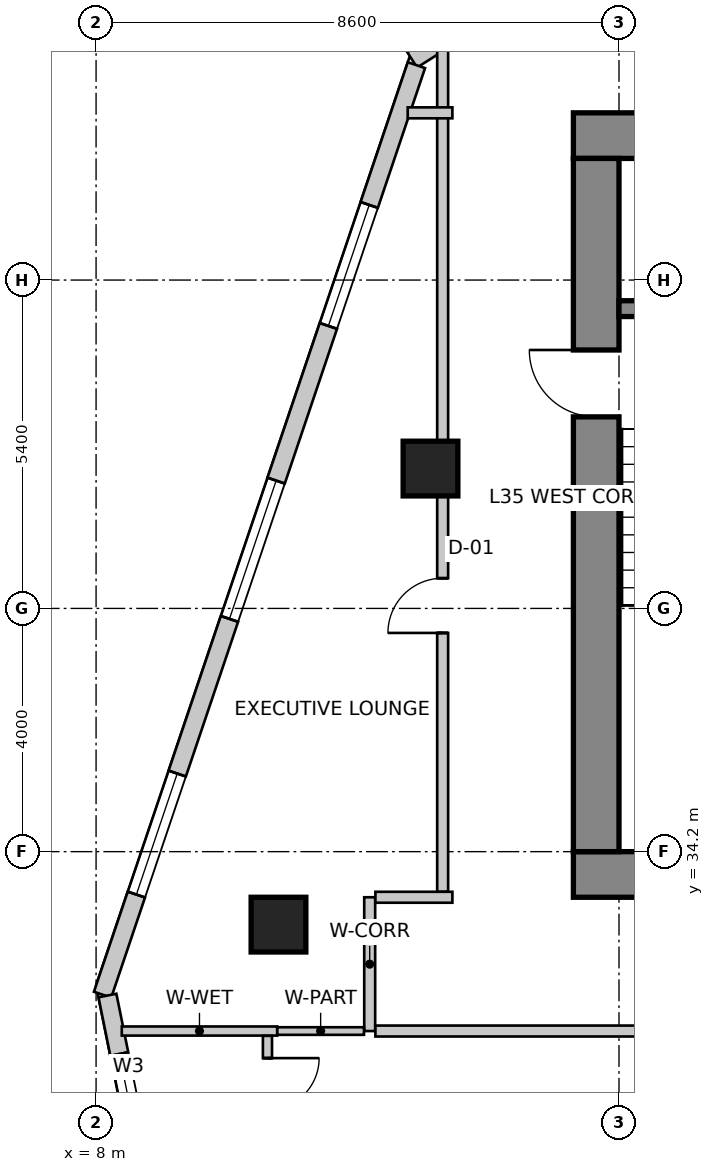
"""IFC4 building model, lengths in metres.
Left out: names, types, materials, properties, quantities, classifications, styles, units other than length and angle.
Written with IfcOpenShell. Run it as: python <this file> out.ifc"""

import sys

from ifc_helpers import new_model, si_unit, direction, frame, frame_2d, origin, origin_2d, place, context, subcontext, project, spatial, rectangle, extrude, source, transform, mapped, element, fill, save


model = new_model("IFC4")
c1 = context("Model", 3, precision=1e-05, world=origin(), true_north=direction((0.0, 1.0)))
c2 = subcontext(c1, "Body", "Model", "MODEL_VIEW")
j1 = project(units=[si_unit("LENGTHUNIT", "METRE"), si_unit("PLANEANGLEUNIT", "RADIAN")], contexts=[c1])
p1 = place(None, origin())
s1 = spatial("IfcSite", under=j1, at=p1, CompositionType="ELEMENT")
p2 = place(p1, origin())
s2 = spatial("IfcBuilding", under=s1, at=p2, CompositionType="ELEMENT")
p3 = place(p2, frame((0.0, 0.0, 143.0)))
s3 = spatial("IfcBuildingStorey", under=s2, at=p3, CompositionType="ELEMENT", Elevation=143.0)
p4 = place(p3, frame((15.85, 45.975, 0.0), z_axis=(0.0, 0.0, 1.0), x_axis=(1.0, 0.0, 0.0)))
e1 = element("IfcWall", 1, at=p4, inside=s3, PredefinedType="SHEAR", context=c2, shape_type="SweptSolid", body=[
    extrude(rectangle(XDim=15.9, YDim=0.75, at=frame_2d((7.95, 0.0))), origin(), (0.0, 0.0, 1.0), 3.6),
])
p5 = place(p3, frame((15.85, 33.825, 0.0), z_axis=(0.0, 0.0, 1.0), x_axis=(1.0, 0.0, 0.0)))
e2 = element("IfcWall", 2, at=p5, inside=s3, PredefinedType="SHEAR", context=c2, shape_type="SweptSolid", body=[
    extrude(rectangle(XDim=15.9, YDim=0.75, at=frame_2d((7.95, 0.0))), origin(), (0.0, 0.0, 1.0), 3.6),
])
m1 = source(origin(), c2, "Body", "SweptSolid", [
    extrude(rectangle(XDim=1.3, YDim=2.15, at=frame_2d((0.65, 1.075))), frame((0.0, 0.385, 0.0), z_axis=(0.0, -1.0, 0.0), x_axis=(1.0, 0.0, 0.0)), (0.0, 0.0, 1.0), 0.77),
])
p6 = place(p5, frame((10.08, 0.0, 0.0)))
e3 = element("IfcOpeningElement", 3, at=p6, cuts=e2, PredefinedType="OPENING", context=c2, shape_type="MappedRepresentation", body=[
    mapped(m1, transform((0.0, 0.0, 0.0), scale=1.0)),
])
p7 = place(p3, frame((16.225, 34.2, 0.0), z_axis=(0.0, 0.0, 1.0), x_axis=(0.0, 1.0, 0.0)))
e4 = element("IfcWall", 4, at=p7, inside=s3, PredefinedType="SHEAR", context=c2, shape_type="SweptSolid", body=[
    extrude(rectangle(XDim=11.4, YDim=0.75, at=frame_2d((5.7, 0.0))), origin(), (0.0, 0.0, 1.0), 3.6),
])
m2 = source(origin(), c2, "Body", "SweptSolid", [
    extrude(rectangle(XDim=1.1, YDim=2.15, at=frame_2d((0.55, 1.075))), frame((0.0, 0.385, 0.0), z_axis=(0.0, -1.0, 0.0), x_axis=(1.0, 0.0, 0.0)), (0.0, 0.0, 1.0), 0.77),
])
p8 = place(p7, frame((7.15, 0.0, 0.0)))
e5 = element("IfcOpeningElement", 5, at=p8, cuts=e4, PredefinedType="OPENING", context=c2, shape_type="MappedRepresentation", body=[
    mapped(m2, transform((0.0, 0.0, 0.0), scale=1.0)),
])
p9 = place(p3, frame((16.6, 43.13, 0.0), z_axis=(0.0, 0.0, 1.0), x_axis=(1.0, 0.0, 0.0)))
e6 = element("IfcWall", 6, at=p9, inside=s3, PredefinedType="SHEAR", context=c2, shape_type="SweptSolid", body=[
    extrude(rectangle(XDim=3.5, YDim=0.26, at=frame_2d((1.75, 0.0))), origin(), (0.0, 0.0, 1.0), 3.6),
])
m3 = source(origin(), c2, "Body", "SweptSolid", [
    extrude(rectangle(XDim=0.9, YDim=0.9, at=origin_2d()), origin(), (0.0, 0.0, 1.0), 3.6),
])
for number, where, z_axis, x_axis in (
    (7, (11.0, 33.0, 0.0), (0.0, 0.0, 1.0), (1.0, 0.0, 0.0)),
    (8, (13.5, 40.5, 0.0), (0.0, 0.0, 1.0), (1.0, 0.0, 0.0)),
):
    element("IfcColumn", number, at=place(p3, frame(where, z_axis=z_axis, x_axis=x_axis)), inside=s3, PredefinedType="COLUMN", context=c2, shape_type="MappedRepresentation", body=[
        mapped(m3, transform((0.0, 0.0, 0.0), scale=1.0)),
    ])
p10 = place(p3, frame((21.875, 52.742, 0.0), z_axis=(0.0, 0.0, 1.0), x_axis=(-0.843662465249, -0.536873956092, 0.0)))
e9 = element("IfcWall", 9, at=p10, inside=s3, PredefinedType="SOLIDWALL", context=c2, shape_type="SweptSolid", body=[
    extrude(rectangle(XDim=10.284, YDim=0.3, at=frame_2d((5.142, 0.0))), origin(), (0.0, 0.0, 1.0), 3.35),
])
m4 = source(origin(), c2, "Body", "SweptSolid", [
    extrude(rectangle(XDim=2.4, YDim=2.2, at=frame_2d((1.2, 1.1))), frame((0.0, 0.16, 0.0), z_axis=(0.0, -1.0, 0.0), x_axis=(1.0, 0.0, 0.0)), (0.0, 0.0, 1.0), 0.32),
])
p11 = place(p10, frame((2.656, 0.0, 0.85)))
e10 = element("IfcOpeningElement", 10, at=p11, cuts=e9, PredefinedType="OPENING", context=c2, shape_type="MappedRepresentation", body=[
    mapped(m4, transform((0.0, 0.0, 0.0), scale=1.0)),
])
m5 = source(origin(), c2, "Body", "SweptSolid", [
    extrude(rectangle(XDim=1.5, YDim=1.8, at=frame_2d((0.75, 0.9))), frame((0.0, 0.16, 0.0), z_axis=(0.0, -1.0, 0.0), x_axis=(1.0, 0.0, 0.0)), (0.0, 0.0, 1.0), 0.32),
])
p12 = place(p10, frame((7.937, 0.0, 0.85)))
e11 = element("IfcOpeningElement", 11, at=p12, cuts=e9, PredefinedType="OPENING", context=c2, shape_type="MappedRepresentation", body=[
    mapped(m5, transform((0.0, 0.0, 0.0), scale=1.0)),
])
p13 = place(p3, frame((13.269, 47.134, 0.0), z_axis=(0.0, 0.0, 1.0), x_axis=(-0.319929773322, -0.947441259468, 0.0)))
e12 = element("IfcWall", 12, at=p13, inside=s3, PredefinedType="SOLIDWALL", context=c2, shape_type="SweptSolid", body=[
    extrude(rectangle(XDim=16.134, YDim=0.3, at=frame_2d((8.067, 0.0))), origin(), (0.0, 0.0, 1.0), 3.35),
])
m6 = source(origin(), c2, "Body", "SweptSolid", [
    extrude(rectangle(XDim=2.1, YDim=2.0, at=frame_2d((1.05, 1.0))), frame((0.0, 0.16, 0.0), z_axis=(0.0, -1.0, 0.0), x_axis=(1.0, 0.0, 0.0)), (0.0, 0.0, 1.0), 0.32),
])
p14 = place(p13, frame((2.426, 0.0, 0.85)))
e13 = element("IfcOpeningElement", 13, at=p14, cuts=e12, PredefinedType="OPENING", context=c2, shape_type="MappedRepresentation", body=[
    mapped(m6, transform((0.0, 0.0, 0.0), scale=1.0)),
])
p15 = place(p13, frame((7.211, 0.0, 0.85)))
e14 = element("IfcOpeningElement", 14, at=p15, cuts=e12, PredefinedType="OPENING", context=c2, shape_type="MappedRepresentation", body=[
    mapped(m4, transform((0.0, 0.0, 0.0), scale=1.0)),
])
p16 = place(p13, frame((12.296, 0.0, 0.85)))
e15 = element("IfcOpeningElement", 15, at=p16, cuts=e12, PredefinedType="OPENING", context=c2, shape_type="MappedRepresentation", body=[
    mapped(m6, transform((0.0, 0.0, 0.0), scale=1.0)),
])
p17 = place(p3, frame((8.187, 31.834, 0.0), z_axis=(0.0, 0.0, 1.0), x_axis=(0.198869838988, -0.980025911464, 0.0)))
e16 = element("IfcWall", 16, at=p17, inside=s3, PredefinedType="SOLIDWALL", context=c2, shape_type="SweptSolid", body=[
    extrude(rectangle(XDim=16.363, YDim=0.3, at=frame_2d((8.182, 0.0))), origin(), (0.0, 0.0, 1.0), 3.35),
])
p18 = place(p17, frame((0.981, 0.0, 0.85)))
e17 = element("IfcOpeningElement", 17, at=p18, cuts=e16, PredefinedType="OPENING", context=c2, shape_type="MappedRepresentation", body=[
    mapped(m5, transform((0.0, 0.0, 0.0), scale=1.0)),
])
p19 = place(p17, frame((4.195, 0.0, 0.85)))
e18 = element("IfcOpeningElement", 18, at=p19, cuts=e16, PredefinedType="OPENING", context=c2, shape_type="MappedRepresentation", body=[
    mapped(m4, transform((0.0, 0.0, 0.0), scale=1.0)),
])
p20 = place(p17, frame((9.007, 0.0, 0.85)))
e19 = element("IfcOpeningElement", 19, at=p20, cuts=e16, PredefinedType="OPENING", context=c2, shape_type="MappedRepresentation", body=[
    mapped(m6, transform((0.0, 0.0, 0.0), scale=1.0)),
])
p21 = place(p17, frame((13.236, 0.0, 0.85)))
e20 = element("IfcOpeningElement", 20, at=p21, cuts=e16, PredefinedType="OPENING", context=c2, shape_type="MappedRepresentation", body=[
    mapped(m4, transform((0.0, 0.0, 0.0), scale=1.0)),
])
p22 = place(p3, frame((12.5, 31.25, 0.0), z_axis=(0.0, 0.0, 1.0), x_axis=(0.0, 1.0, 0.0)))
e21 = element("IfcWall", 21, at=p22, inside=s3, PredefinedType="PARTITIONING", context=c2, shape_type="SweptSolid", body=[
    extrude(rectangle(XDim=2.2, YDim=0.18, at=frame_2d((1.1, 0.0))), origin(), (0.0, 0.0, 1.0), 3.034),
])
p23 = place(p3, frame((12.594, 33.45, 0.0), z_axis=(0.0, 0.0, 1.0), x_axis=(1.0, 0.0, 0.0)))
e22 = element("IfcWall", 22, at=p23, inside=s3, PredefinedType="PARTITIONING", context=c2, shape_type="SweptSolid", body=[
    extrude(rectangle(XDim=1.266, YDim=0.18, at=frame_2d((0.633, 0.0))), origin(), (0.0, 0.0, 1.0), 3.35),
])
p24 = place(p3, frame((17.96, 31.25, 0.0), z_axis=(0.0, 0.0, 1.0), x_axis=(-1.0, 0.0, 0.0)))
e23 = element("IfcWall", 23, at=p24, inside=s3, PredefinedType="PARTITIONING", context=c2, shape_type="SweptSolid", body=[
    extrude(rectangle(XDim=5.366, YDim=0.18, at=frame_2d((2.683, 0.0))), origin(), (0.0, 0.0, 1.0), 3.034),
])
p25 = place(p3, frame((13.7, 33.544, 0.0), z_axis=(0.0, 0.0, 1.0), x_axis=(0.0, 1.0, 0.0)))
e24 = element("IfcWall", 24, at=p25, inside=s3, PredefinedType="PARTITIONING", context=c2, shape_type="SweptSolid", body=[
    extrude(rectangle(XDim=13.86, YDim=0.18, at=frame_2d((6.93, 0.0))), origin(), (0.0, 0.0, 1.0), 2.492),
])
m7 = source(origin(), c2, "Body", "SweptSolid", [
    extrude(rectangle(XDim=0.9, YDim=2.15, at=frame_2d((0.45, 1.075))), frame((0.0, 0.1, 0.0), z_axis=(0.0, -1.0, 0.0), x_axis=(1.0, 0.0, 0.0)), (0.0, 0.0, 1.0), 0.2),
])
p26 = place(p25, frame((4.253, 0.0, 0.0)))
e25 = element("IfcOpeningElement", 25, at=p26, cuts=e24, PredefinedType="OPENING", context=c2, shape_type="MappedRepresentation", body=[
    mapped(m7, transform((0.0, 0.0, 0.0), scale=1.0)),
])
p27 = place(p3, frame((13.86, 46.35, 0.0), z_axis=(0.0, 0.0, 1.0), x_axis=(-1.0, 0.0, 0.0)))
e26 = element("IfcWall", 26, at=p27, inside=s3, PredefinedType="PARTITIONING", context=c2, shape_type="SweptSolid", body=[
    extrude(rectangle(XDim=0.735, YDim=0.18, at=frame_2d((0.367, 0.0))), origin(), (0.0, 0.0, 1.0), 3.35),
])
p28 = place(p3, frame((10.979, 31.25, 0.0), z_axis=(0.0, 0.0, 1.0), x_axis=(-1.0, 0.0, 0.0)))
e27 = element("IfcWall", 27, at=p28, inside=s3, PredefinedType="PARTITIONING", context=c2, shape_type="SweptSolid", body=[
    extrude(rectangle(XDim=2.556, YDim=0.15, at=frame_2d((1.278, 0.0))), origin(), (0.0, 0.0, 1.0), 2.492),
])
p29 = place(p3, frame((12.406, 31.25, 0.0), z_axis=(0.0, 0.0, 1.0), x_axis=(-1.0, 0.0, 0.0)))
e28 = element("IfcWall", 28, at=p29, inside=s3, PredefinedType="PARTITIONING", context=c2, shape_type="SweptSolid", body=[
    extrude(rectangle(XDim=1.426, YDim=0.125, at=frame_2d((0.713, 0.0))), origin(), (0.0, 0.0, 1.0), 2.492),
])
p30 = place(p3, frame((10.819, 31.171, 0.0), z_axis=(0.0, 0.0, 1.0), x_axis=(0.0, -1.0, 0.0)))
e29 = element("IfcWall", 29, at=p30, inside=s3, PredefinedType="PARTITIONING", context=c2, shape_type="SweptSolid", body=[
    extrude(rectangle(XDim=2.101, YDim=0.15, at=frame_2d((1.05, 0.0))), origin(), (0.0, 0.0, 1.0), 2.492),
])
m8 = source(origin(), c2, "Body", "SweptSolid", [
    extrude(rectangle(XDim=0.85, YDim=2.15, at=frame_2d((0.425, 1.075))), frame((0.0, 0.085, 0.0), z_axis=(0.0, -1.0, 0.0), x_axis=(1.0, 0.0, 0.0)), (0.0, 0.0, 1.0), 0.17),
])
p31 = place(p30, frame((0.366, 0.0, 0.0)))
e30 = element("IfcOpeningElement", 30, at=p31, cuts=e29, PredefinedType="OPENING", context=c2, shape_type="MappedRepresentation", body=[
    mapped(m8, transform((0.0, 0.0, 0.0), scale=1.0)),
])
m9 = source(origin(), c2, "Body", "SweptSolid", [
    extrude(rectangle(XDim=2.1, YDim=2.0, at=frame_2d((1.05, 1.0))), frame((0.0, -0.015, 0.0), z_axis=(0.0, -1.0, 0.0), x_axis=(1.0, 0.0, 0.0)), (0.0, 0.0, 1.0), 0.06),
])
p32 = place(p14, origin())
e31 = element("IfcWindow", 31, at=p32, inside=s3, PartitioningType="SINGLE_PANEL", PredefinedType="WINDOW", context=c2, shape_type="MappedRepresentation", body=[
    mapped(m9, transform((0.0, 0.0, 0.0), scale=1.0)),
])
fill(e13, e31)
m10 = source(origin(), c2, "Body", "SweptSolid", [
    extrude(rectangle(XDim=2.4, YDim=2.2, at=frame_2d((1.2, 1.1))), frame((0.0, -0.015, 0.0), z_axis=(0.0, -1.0, 0.0), x_axis=(1.0, 0.0, 0.0)), (0.0, 0.0, 1.0), 0.06),
])
p33 = place(p15, origin())
e32 = element("IfcWindow", 32, at=p33, inside=s3, PartitioningType="SINGLE_PANEL", PredefinedType="WINDOW", context=c2, shape_type="MappedRepresentation", body=[
    mapped(m10, transform((0.0, 0.0, 0.0), scale=1.0)),
])
fill(e14, e32)
p34 = place(p16, origin())
e33 = element("IfcWindow", 33, at=p34, inside=s3, PartitioningType="SINGLE_PANEL", PredefinedType="WINDOW", context=c2, shape_type="MappedRepresentation", body=[
    mapped(m9, transform((0.0, 0.0, 0.0), scale=1.0)),
])
fill(e15, e33)
m11 = source(origin(), c2, "Body", "SweptSolid", [
    extrude(rectangle(XDim=1.5, YDim=1.8, at=frame_2d((0.75, 0.9))), frame((0.0, -0.015, 0.0), z_axis=(0.0, -1.0, 0.0), x_axis=(1.0, 0.0, 0.0)), (0.0, 0.0, 1.0), 0.06),
])
p35 = place(p18, origin())
e34 = element("IfcWindow", 34, at=p35, inside=s3, PartitioningType="SINGLE_PANEL", PredefinedType="WINDOW", context=c2, shape_type="MappedRepresentation", body=[
    mapped(m11, transform((0.0, 0.0, 0.0), scale=1.0)),
])
fill(e17, e34)
m12 = source(origin(), c2, "Body", "SweptSolid", [
    extrude(rectangle(XDim=1.1, YDim=2.15, at=frame_2d((0.55, 1.075))), frame((0.0, 0.025, 0.0), z_axis=(0.0, -1.0, 0.0), x_axis=(1.0, 0.0, 0.0)), (0.0, 0.0, 1.0), 0.05),
])
p36 = place(p8, origin())
e35 = element("IfcDoor", 35, at=p36, inside=s3, OperationType="SINGLE_SWING_RIGHT", PredefinedType="DOOR", context=c2, shape_type="MappedRepresentation", body=[
    mapped(m12, transform((0.0, 0.0, 0.0), scale=1.0)),
])
fill(e5, e35)
m13 = source(origin(), c2, "Body", "SweptSolid", [
    extrude(rectangle(XDim=0.9, YDim=2.15, at=frame_2d((0.45, 1.075))), frame((0.0, 0.025, 0.0), z_axis=(0.0, -1.0, 0.0), x_axis=(1.0, 0.0, 0.0)), (0.0, 0.0, 1.0), 0.05),
])
p37 = place(p26, origin())
e36 = element("IfcDoor", 36, at=p37, inside=s3, OperationType="SINGLE_SWING_LEFT", PredefinedType="DOOR", context=c2, shape_type="MappedRepresentation", body=[
    mapped(m13, transform((0.0, 0.0, 0.0), scale=1.0)),
])
fill(e25, e36)
m14 = source(origin(), c2, "Body", "SweptSolid", [
    extrude(rectangle(XDim=0.85, YDim=2.15, at=frame_2d((0.425, 1.075))), frame((0.0, 0.025, 0.0), z_axis=(0.0, -1.0, 0.0), x_axis=(1.0, 0.0, 0.0)), (0.0, 0.0, 1.0), 0.05),
])
p38 = place(p31, origin())
e37 = element("IfcDoor", 37, at=p38, inside=s3, OperationType="SINGLE_SWING_LEFT", PredefinedType="DOOR", context=c2, shape_type="MappedRepresentation", body=[
    mapped(m14, transform((0.0, 0.0, 0.0), scale=1.0)),
])
fill(e30, e37)
save(model, sys.argv[1])
